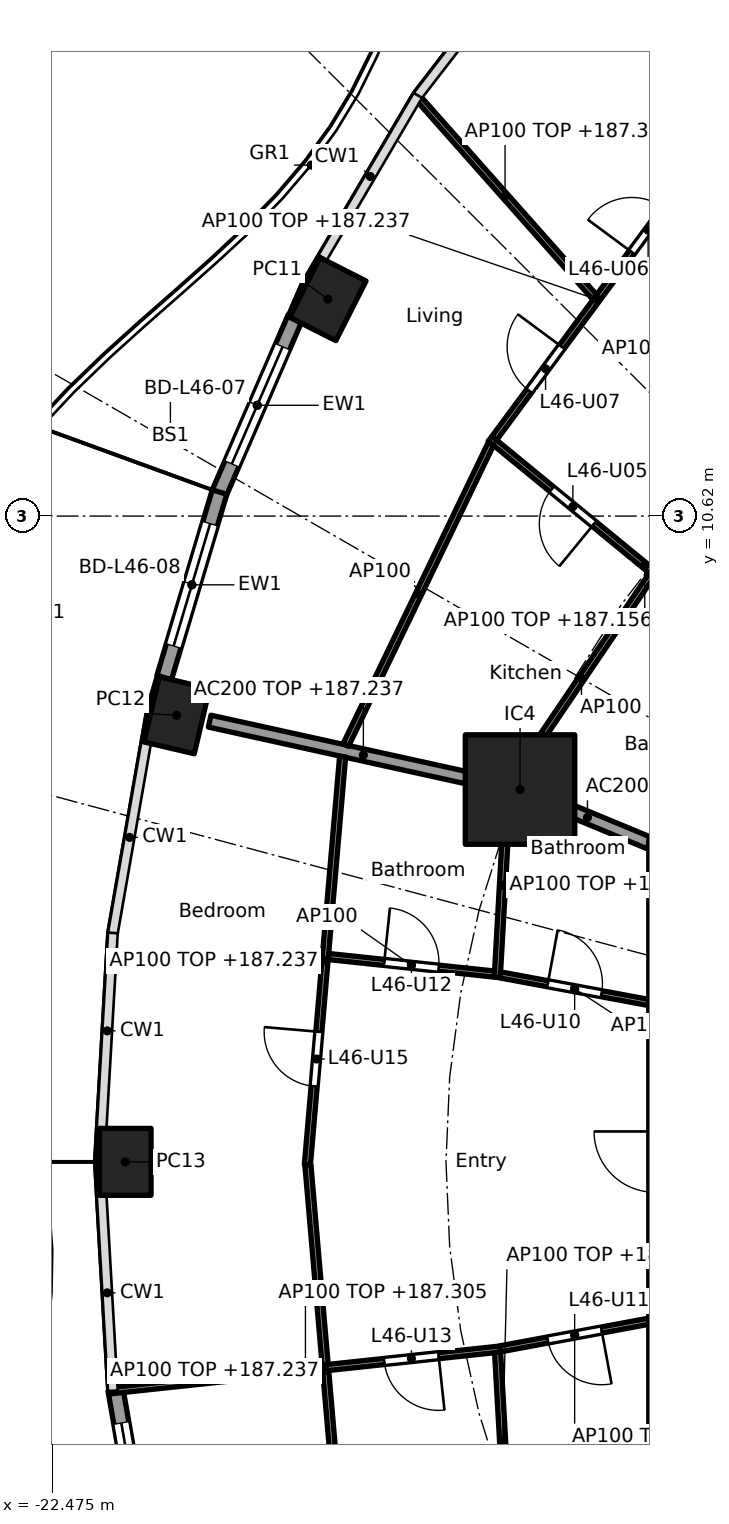
"""IFC4 building model, lengths in metres.
Left out: names, types, materials, properties, quantities, classifications, styles, units other than length and angle.
Written with IfcOpenShell. Run it as: python <this file> out.ifc"""

import sys

from ifc_helpers import new_model, si_unit, direction, frame, frame_2d, origin, origin_2d, place, context, subcontext, project, spatial, rectangle, hollow_rectangle, extrude, element, fill, save


model = new_model("IFC4")
c1 = context("Model", 3, precision=1e-05, world=origin(), true_north=direction((0.0, 1.0)))
c2 = subcontext(c1, "Body", "Model", "MODEL_VIEW")
j1 = project(units=[si_unit("LENGTHUNIT", "METRE"), si_unit("PLANEANGLEUNIT", "RADIAN")], contexts=[c1])
p1 = place(None, origin())
s1 = spatial("IfcSite", under=j1, at=p1, CompositionType="ELEMENT")
p2 = place(p1, origin())
s2 = spatial("IfcBuilding", under=s1, at=p2, CompositionType="ELEMENT")
p3 = place(p2, frame((0.0, 0.0, 184.4)))
s3 = spatial("IfcBuildingStorey", under=s2, at=p3, CompositionType="ELEMENT", Elevation=184.4)
for number, where, z_axis, x_axis in (
    (1, (-17.942, 14.188, 0.0), (0.0, 0.0, 1.0), (-0.452, -0.892, 0.0)),
    (2, (-20.427, 7.344, 0.0), (0.0, 0.0, 1.0), (-0.229, -0.973, 0.0)),
    (3, (-21.275, 0.0, 0.0), (0.0, 0.0, 1.0), (0.0, -1.0, 0.0)),
):
    element("IfcColumn", number, at=place(p3, frame(where, z_axis=z_axis, x_axis=x_axis)), inside=s3, PredefinedType="COLUMN", context=c2, shape_type="SweptSolid", body=[
        extrude(hollow_rectangle(XDim=1.1, YDim=0.85, WallThickness=0.036, at=origin_2d()), origin(), (0.0, 0.0, 1.0), 3.7),
    ])
p4 = place(p3, frame((-14.782, 6.123, 0.0), z_axis=(0.0, 0.0, 1.0), x_axis=(1.0, 0.0, 0.0)))
e4 = element("IfcColumn", 4, at=p4, inside=s3, PredefinedType="COLUMN", context=c2, shape_type="SweptSolid", body=[
    extrude(rectangle(XDim=1.8, YDim=1.8, at=origin_2d()), origin(), (0.0, 0.0, 1.0), 3.7),
])
p5 = place(p3, frame((-19.729, 11.0, 0.0), z_axis=(0.0, 0.0, 1.0), x_axis=(0.397620521824, 0.917549955384, 0.0)))
e5 = element("IfcWall", 5, at=p5, inside=s3, PredefinedType="SOLIDWALL", context=c2, shape_type="SweptSolid", body=[
    extrude(rectangle(XDim=3.142, YDim=0.25, at=frame_2d((1.571, 0.0))), origin(), (0.0, 0.0, 1.0), 3.44),
])
p6 = place(p5, frame((0.521, 0.0, 0.0)))
e6 = element("IfcOpeningElement", 6, at=p6, cuts=e5, PredefinedType="OPENING", context=c2, shape_type="SweptSolid", body=[
    extrude(rectangle(XDim=2.1, YDim=2.4, at=frame_2d((1.05, 1.2))), frame((0.0, 0.135, 0.0), z_axis=(0.0, -1.0, 0.0), x_axis=(1.0, 0.0, 0.0)), (0.0, 0.0, 1.0), 0.27),
])
p7 = place(p3, frame((-20.633, 7.965, 0.0), z_axis=(0.0, 0.0, 1.0), x_axis=(0.28584838049, 0.958274857946, 0.0)))
e7 = element("IfcWall", 7, at=p7, inside=s3, PredefinedType="SOLIDWALL", context=c2, shape_type="SweptSolid", body=[
    extrude(rectangle(XDim=3.182, YDim=0.25, at=frame_2d((1.591, 0.0))), origin(), (0.0, 0.0, 1.0), 3.44),
])
p8 = place(p7, frame((0.541, 0.0, 0.0)))
e8 = element("IfcOpeningElement", 8, at=p8, cuts=e7, PredefinedType="OPENING", context=c2, shape_type="SweptSolid", body=[
    extrude(rectangle(XDim=2.1, YDim=2.4, at=frame_2d((1.05, 1.2))), frame((0.0, 0.135, 0.0), z_axis=(0.0, -1.0, 0.0), x_axis=(1.0, 0.0, 0.0)), (0.0, 0.0, 1.0), 0.27),
])
p9 = place(p3, frame((-20.882, -6.91, 0.0), z_axis=(0.0, 0.0, 1.0), x_axis=(-0.172223552479, 0.98505789067, 0.0)))
e9 = element("IfcWall", 9, at=p9, inside=s3, PredefinedType="SOLIDWALL", context=c2, shape_type="SweptSolid", body=[
    extrude(rectangle(XDim=3.211, YDim=0.25, at=frame_2d((1.605, 0.0))), origin(), (0.0, 0.0, 1.0), 3.44),
])
p10 = place(p9, frame((0.555, 0.0, 0.0)))
e10 = element("IfcOpeningElement", 10, at=p10, cuts=e9, PredefinedType="OPENING", context=c2, shape_type="SweptSolid", body=[
    extrude(rectangle(XDim=2.1, YDim=2.4, at=frame_2d((1.05, 1.2))), frame((0.0, 0.135, 0.0), z_axis=(0.0, -1.0, 0.0), x_axis=(1.0, 0.0, 0.0)), (0.0, 0.0, 1.0), 0.27),
])
p11 = place(p3, frame((-12.657, 5.243, 0.0), z_axis=(0.0, 0.0, 1.0), x_axis=(-0.923859888513, 0.38273085373, 0.0)))
e11 = element("IfcWall", 11, at=p11, inside=s3, PredefinedType="PARTITIONING", context=c2, shape_type="SweptSolid", body=[
    extrude(rectangle(XDim=2.199, YDim=0.2, at=frame_2d((1.1, 0.0))), origin(), (0.0, 0.0, 1.0), 3.44),
])
p12 = place(p3, frame((-14.831, 6.134, 0.0), z_axis=(0.0, 0.0, 1.0), x_axis=(-0.976568396888, 0.215207263354, 0.0)))
e12 = element("IfcWall", 12, at=p12, inside=s3, PredefinedType="PARTITIONING", context=c2, shape_type="SweptSolid", body=[
    extrude(rectangle(XDim=5.177, YDim=0.2, at=frame_2d((2.588, 0.0))), origin(), (0.0, 0.0, 1.0), 2.837),
])
p13 = place(p3, frame((-12.565, 5.304, 0.0), z_axis=(0.0, 0.0, 1.0), x_axis=(0.0, -1.0, 0.0)))
e13 = element("IfcWall", 13, at=p13, inside=s3, PredefinedType="PARTITIONING", context=c2, shape_type="SweptSolid", body=[
    extrude(rectangle(XDim=10.409, YDim=0.2, at=frame_2d((5.205, 0.0))), origin(), (0.0, 0.0, 1.0), 3.44),
])
p14 = place(p13, frame((4.804, 0.0, 0.0)))
e14 = element("IfcOpeningElement", 14, at=p14, cuts=e13, PredefinedType="OPENING", context=c2, shape_type="SweptSolid", body=[
    extrude(rectangle(XDim=1.0, YDim=2.1, at=frame_2d((0.5, 1.05))), frame((0.0, 0.11, 0.0), z_axis=(0.0, -1.0, 0.0), x_axis=(1.0, 0.0, 0.0)), (0.0, 0.0, 1.0), 0.22),
])
p15 = place(p3, frame((-11.832, 16.461, 0.0), z_axis=(0.0, 0.0, 1.0), x_axis=(-0.594704483906, -0.803944386647, 0.0)))
e15 = element("IfcWall", 15, at=p15, inside=s3, PredefinedType="PARTITIONING", context=c2, shape_type="SweptSolid", body=[
    extrude(rectangle(XDim=5.672, YDim=0.1, at=frame_2d((2.836, 0.0))), origin(), (0.0, 0.0, 1.0), 2.837),
])
p16 = place(p15, frame((0.968, 0.0, 0.0)))
e16 = element("IfcOpeningElement", 16, at=p16, cuts=e15, PredefinedType="OPENING", context=c2, shape_type="SweptSolid", body=[
    extrude(rectangle(XDim=0.9, YDim=2.1, at=frame_2d((0.45, 1.05))), frame((0.0, 0.06, 0.0), z_axis=(0.0, -1.0, 0.0), x_axis=(1.0, 0.0, 0.0)), (0.0, 0.0, 1.0), 0.12),
])
p17 = place(p15, frame((3.804, 0.0, 0.0)))
e17 = element("IfcOpeningElement", 17, at=p17, cuts=e15, PredefinedType="OPENING", context=c2, shape_type="SweptSolid", body=[
    extrude(rectangle(XDim=0.9, YDim=2.1, at=frame_2d((0.45, 1.05))), frame((0.0, 0.06, 0.0), z_axis=(0.0, -1.0, 0.0), x_axis=(1.0, 0.0, 0.0)), (0.0, 0.0, 1.0), 0.12),
])
p18 = place(p3, frame((-13.552, 14.219, 0.0), z_axis=(0.0, 0.0, 1.0), x_axis=(-0.663542794709, 0.748138329181, 0.0)))
e18 = element("IfcWall", 18, at=p18, inside=s3, PredefinedType="PARTITIONING", context=c2, shape_type="SweptSolid", body=[
    extrude(rectangle(XDim=4.45, YDim=0.1, at=frame_2d((2.225, 0.0))), origin(), (0.0, 0.0, 1.0), 2.905),
])
p19 = place(p3, frame((-10.189, 7.721, 0.0), z_axis=(0.0, 0.0, 1.0), x_axis=(-0.773121441079, 0.634258021112, 0.0)))
e19 = element("IfcWall", 19, at=p19, inside=s3, PredefinedType="PARTITIONING", context=c2, shape_type="SweptSolid", body=[
    extrude(rectangle(XDim=6.577, YDim=0.1, at=frame_2d((3.289, 0.0))), origin(), (0.0, 0.0, 1.0), 2.756),
])
p20 = place(p19, frame((1.104, 0.0, 0.0)))
e20 = element("IfcOpeningElement", 20, at=p20, cuts=e19, PredefinedType="OPENING", context=c2, shape_type="SweptSolid", body=[
    extrude(rectangle(XDim=0.9, YDim=2.1, at=frame_2d((0.45, 1.05))), frame((0.0, 0.06, 0.0), z_axis=(0.0, -1.0, 0.0), x_axis=(1.0, 0.0, 0.0)), (0.0, 0.0, 1.0), 0.12),
])
p21 = place(p19, frame((4.367, 0.0, 0.0)))
e21 = element("IfcOpeningElement", 21, at=p21, cuts=e19, PredefinedType="OPENING", context=c2, shape_type="SweptSolid", body=[
    extrude(rectangle(XDim=0.9, YDim=2.1, at=frame_2d((0.45, 1.05))), frame((0.0, 0.06, 0.0), z_axis=(0.0, -1.0, 0.0), x_axis=(1.0, 0.0, 0.0)), (0.0, 0.0, 1.0), 0.12),
])
p22 = place(p3, frame((-12.619, 9.65, 0.0), z_axis=(0.0, 0.0, 1.0), x_axis=(-0.561046521684, -0.82778427172, 0.0)))
e22 = element("IfcWall", 22, at=p22, inside=s3, PredefinedType="PARTITIONING", context=c2, shape_type="SweptSolid", body=[
    extrude(rectangle(XDim=4.109, YDim=0.1, at=frame_2d((2.054, 0.0))), origin(), (0.0, 0.0, 1.0), 3.44),
])
p23 = place(p3, frame((-15.257, 11.816, 0.0), z_axis=(0.0, 0.0, 1.0), x_axis=(-0.434027506504, -0.900899619046, 0.0)))
e23 = element("IfcWall", 23, at=p23, inside=s3, PredefinedType="PARTITIONING", context=c2, shape_type="SweptSolid", body=[
    extrude(rectangle(XDim=5.508, YDim=0.1, at=frame_2d((2.754, 0.0))), origin(), (0.0, 0.0, 1.0), 3.44),
])
p24 = place(p3, frame((-14.986, 6.067, 0.0), z_axis=(0.0, 0.0, 1.0), x_axis=(-0.056333452925, -0.998412010185, 0.0)))
e24 = element("IfcWall", 24, at=p24, inside=s3, PredefinedType="PARTITIONING", context=c2, shape_type="SweptSolid", body=[
    extrude(rectangle(XDim=3.038, YDim=0.1, at=frame_2d((1.519, 0.0))), origin(), (0.0, 0.0, 1.0), 2.837),
])
p25 = place(p3, frame((-17.7, 6.664, 0.0), z_axis=(0.0, 0.0, 1.0), x_axis=(-0.086004282666, -0.996294767307, 0.0)))
e25 = element("IfcWall", 25, at=p25, inside=s3, PredefinedType="PARTITIONING", context=c2, shape_type="SweptSolid", body=[
    extrude(rectangle(XDim=6.739, YDim=0.1, at=frame_2d((3.37, 0.0))), origin(), (0.0, 0.0, 1.0), 2.837),
])
p26 = place(p25, frame((4.542, 0.0, 0.0)))
e26 = element("IfcOpeningElement", 26, at=p26, cuts=e25, PredefinedType="OPENING", context=c2, shape_type="SweptSolid", body=[
    extrude(rectangle(XDim=0.9, YDim=2.1, at=frame_2d((0.45, 1.05))), frame((0.0, 0.06, 0.0), z_axis=(0.0, -1.0, 0.0), x_axis=(1.0, 0.0, 0.0)), (0.0, 0.0, 1.0), 0.12),
])
p27 = place(p3, frame((-12.663, 2.621, 0.0), z_axis=(0.0, 0.0, 1.0), x_axis=(-0.983176884312, 0.182655999505, 0.0)))
e27 = element("IfcWall", 27, at=p27, inside=s3, PredefinedType="PARTITIONING", context=c2, shape_type="SweptSolid", body=[
    extrude(rectangle(XDim=2.483, YDim=0.1, at=frame_2d((1.242, 0.0))), origin(), (0.0, 0.0, 1.0), 2.756),
])
p28 = place(p27, frame((0.792, 0.0, 0.0)))
e28 = element("IfcOpeningElement", 28, at=p28, cuts=e27, PredefinedType="OPENING", context=c2, shape_type="SweptSolid", body=[
    extrude(rectangle(XDim=0.9, YDim=2.1, at=frame_2d((0.45, 1.05))), frame((0.0, 0.06, 0.0), z_axis=(0.0, -1.0, 0.0), x_axis=(1.0, 0.0, 0.0)), (0.0, 0.0, 1.0), 0.12),
])
p29 = place(p3, frame((-15.204, 3.089, 0.0), z_axis=(0.0, 0.0, 1.0), x_axis=(-0.994477149695, 0.104953316934, 0.0)))
e29 = element("IfcWall", 29, at=p29, inside=s3, PredefinedType="PARTITIONING", context=c2, shape_type="SweptSolid", body=[
    extrude(rectangle(XDim=2.745, YDim=0.1, at=frame_2d((1.373, 0.0))), origin(), (0.0, 0.0, 1.0), 3.44),
])
p30 = place(p29, frame((0.922, 0.0, 0.0)))
e30 = element("IfcOpeningElement", 30, at=p30, cuts=e29, PredefinedType="OPENING", context=c2, shape_type="SweptSolid", body=[
    extrude(rectangle(XDim=0.9, YDim=2.1, at=frame_2d((0.45, 1.05))), frame((0.0, 0.06, 0.0), z_axis=(0.0, -1.0, 0.0), x_axis=(1.0, 0.0, 0.0)), (0.0, 0.0, 1.0), 0.12),
])
p31 = place(p3, frame((-18.271, -0.05, 0.0), z_axis=(0.0, 0.0, 1.0), x_axis=(0.086018199227, -0.996293565874, 0.0)))
e31 = element("IfcWall", 31, at=p31, inside=s3, PredefinedType="PARTITIONING", context=c2, shape_type="SweptSolid", body=[
    extrude(rectangle(XDim=6.789, YDim=0.1, at=frame_2d((3.395, 0.0))), origin(), (0.0, 0.0, 1.0), 2.837),
])
p32 = place(p3, frame((-12.663, -2.621, 0.0), z_axis=(0.0, 0.0, 1.0), x_axis=(-0.983176884312, -0.182655999505, 0.0)))
e32 = element("IfcWall", 32, at=p32, inside=s3, PredefinedType="PARTITIONING", context=c2, shape_type="SweptSolid", body=[
    extrude(rectangle(XDim=2.483, YDim=0.1, at=frame_2d((1.242, 0.0))), origin(), (0.0, 0.0, 1.0), 2.756),
])
p33 = place(p32, frame((0.792, 0.0, 0.0)))
e33 = element("IfcOpeningElement", 33, at=p33, cuts=e32, PredefinedType="OPENING", context=c2, shape_type="SweptSolid", body=[
    extrude(rectangle(XDim=0.9, YDim=2.1, at=frame_2d((0.45, 1.05))), frame((0.0, 0.06, 0.0), z_axis=(0.0, -1.0, 0.0), x_axis=(1.0, 0.0, 0.0)), (0.0, 0.0, 1.0), 0.12),
])
p34 = place(p3, frame((-15.104, -3.078, 0.0), z_axis=(0.0, 0.0, 1.0), x_axis=(-0.994316167803, -0.106467640365, 0.0)))
e34 = element("IfcWall", 34, at=p34, inside=s3, PredefinedType="PARTITIONING", context=c2, shape_type="SweptSolid", body=[
    extrude(rectangle(XDim=6.45, YDim=0.1, at=frame_2d((3.225, 0.0))), origin(), (0.0, 0.0, 1.0), 2.905),
])
p35 = place(p34, frame((1.022, 0.0, 0.0)))
e35 = element("IfcOpeningElement", 35, at=p35, cuts=e34, PredefinedType="OPENING", context=c2, shape_type="SweptSolid", body=[
    extrude(rectangle(XDim=0.9, YDim=2.1, at=frame_2d((0.45, 1.05))), frame((0.0, 0.06, 0.0), z_axis=(0.0, -1.0, 0.0), x_axis=(1.0, 0.0, 0.0)), (0.0, 0.0, 1.0), 0.12),
])
p36 = place(p3, frame((-15.151, -3.133, 0.0), z_axis=(0.0, 0.0, 1.0), x_axis=(0.05637501378, -0.998409664327, 0.0)))
e36 = element("IfcWall", 36, at=p36, inside=s3, PredefinedType="PARTITIONING", context=c2, shape_type="SweptSolid", body=[
    extrude(rectangle(XDim=2.988, YDim=0.1, at=frame_2d((1.494, 0.0))), origin(), (0.0, 0.0, 1.0), 2.837),
])
p37 = place(p6, origin())
e37 = element("IfcDoor", 37, at=p37, inside=s3, OperationType="SLIDING_TO_LEFT", PredefinedType="DOOR", context=c2, shape_type="SweptSolid", body=[
    extrude(rectangle(XDim=2.1, YDim=2.4, at=frame_2d((1.05, 1.2))), frame((0.0, 0.025, 0.0), z_axis=(0.0, -1.0, 0.0), x_axis=(1.0, 0.0, 0.0)), (0.0, 0.0, 1.0), 0.05),
])
fill(e6, e37)
p38 = place(p8, origin())
e38 = element("IfcDoor", 38, at=p38, inside=s3, OperationType="SLIDING_TO_LEFT", PredefinedType="DOOR", context=c2, shape_type="SweptSolid", body=[
    extrude(rectangle(XDim=2.1, YDim=2.4, at=frame_2d((1.05, 1.2))), frame((0.0, 0.025, 0.0), z_axis=(0.0, -1.0, 0.0), x_axis=(1.0, 0.0, 0.0)), (0.0, 0.0, 1.0), 0.05),
])
fill(e8, e38)
p39 = place(p10, origin())
e39 = element("IfcDoor", 39, at=p39, inside=s3, OperationType="SLIDING_TO_LEFT", PredefinedType="DOOR", context=c2, shape_type="SweptSolid", body=[
    extrude(rectangle(XDim=2.1, YDim=2.4, at=frame_2d((1.05, 1.2))), frame((0.0, 0.025, 0.0), z_axis=(0.0, -1.0, 0.0), x_axis=(1.0, 0.0, 0.0)), (0.0, 0.0, 1.0), 0.05),
])
fill(e10, e39)
p40 = place(p21, origin())
e40 = element("IfcDoor", 40, at=p40, inside=s3, OperationType="SINGLE_SWING_LEFT", PredefinedType="DOOR", context=c2, shape_type="SweptSolid", body=[
    extrude(rectangle(XDim=0.9, YDim=2.1, at=frame_2d((0.45, 1.05))), frame((0.0, 0.025, 0.0), z_axis=(0.0, -1.0, 0.0), x_axis=(1.0, 0.0, 0.0)), (0.0, 0.0, 1.0), 0.05),
])
fill(e21, e40)
p41 = place(p16, frame((0.9, 0.0, 0.0), x_axis=(-1.0, 0.0, 0.0)))
e41 = element("IfcDoor", 41, at=p41, inside=s3, OperationType="SINGLE_SWING_LEFT", PredefinedType="DOOR", context=c2, shape_type="SweptSolid", body=[
    extrude(rectangle(XDim=0.9, YDim=2.1, at=frame_2d((0.45, 1.05))), frame((0.0, 0.025, 0.0), z_axis=(0.0, -1.0, 0.0), x_axis=(1.0, 0.0, 0.0)), (0.0, 0.0, 1.0), 0.05),
])
fill(e16, e41)
p42 = place(p17, frame((0.9, 0.0, 0.0), x_axis=(-1.0, 0.0, 0.0)))
e42 = element("IfcDoor", 42, at=p42, inside=s3, OperationType="SINGLE_SWING_RIGHT", PredefinedType="DOOR", context=c2, shape_type="SweptSolid", body=[
    extrude(rectangle(XDim=0.9, YDim=2.1, at=frame_2d((0.45, 1.05))), frame((0.0, 0.025, 0.0), z_axis=(0.0, -1.0, 0.0), x_axis=(1.0, 0.0, 0.0)), (0.0, 0.0, 1.0), 0.05),
])
fill(e17, e42)
p43 = place(p28, frame((0.9, 0.0, 0.0), x_axis=(-1.0, 0.0, 0.0)))
e43 = element("IfcDoor", 43, at=p43, inside=s3, OperationType="SINGLE_SWING_LEFT", PredefinedType="DOOR", context=c2, shape_type="SweptSolid", body=[
    extrude(rectangle(XDim=0.9, YDim=2.1, at=frame_2d((0.45, 1.05))), frame((0.0, 0.025, 0.0), z_axis=(0.0, -1.0, 0.0), x_axis=(1.0, 0.0, 0.0)), (0.0, 0.0, 1.0), 0.05),
])
fill(e28, e43)
p44 = place(p33, origin())
e44 = element("IfcDoor", 44, at=p44, inside=s3, OperationType="SINGLE_SWING_LEFT", PredefinedType="DOOR", context=c2, shape_type="SweptSolid", body=[
    extrude(rectangle(XDim=0.9, YDim=2.1, at=frame_2d((0.45, 1.05))), frame((0.0, 0.025, 0.0), z_axis=(0.0, -1.0, 0.0), x_axis=(1.0, 0.0, 0.0)), (0.0, 0.0, 1.0), 0.05),
])
fill(e33, e44)
p45 = place(p30, frame((0.9, 0.0, 0.0), x_axis=(-1.0, 0.0, 0.0)))
e45 = element("IfcDoor", 45, at=p45, inside=s3, OperationType="SINGLE_SWING_LEFT", PredefinedType="DOOR", context=c2, shape_type="SweptSolid", body=[
    extrude(rectangle(XDim=0.9, YDim=2.1, at=frame_2d((0.45, 1.05))), frame((0.0, 0.025, 0.0), z_axis=(0.0, -1.0, 0.0), x_axis=(1.0, 0.0, 0.0)), (0.0, 0.0, 1.0), 0.05),
])
fill(e30, e45)
p46 = place(p35, origin())
e46 = element("IfcDoor", 46, at=p46, inside=s3, OperationType="SINGLE_SWING_LEFT", PredefinedType="DOOR", context=c2, shape_type="SweptSolid", body=[
    extrude(rectangle(XDim=0.9, YDim=2.1, at=frame_2d((0.45, 1.05))), frame((0.0, 0.025, 0.0), z_axis=(0.0, -1.0, 0.0), x_axis=(1.0, 0.0, 0.0)), (0.0, 0.0, 1.0), 0.05),
])
fill(e35, e46)
p47 = place(p26, frame((0.9, 0.0, 0.0), x_axis=(-1.0, 0.0, 0.0)))
e47 = element("IfcDoor", 47, at=p47, inside=s3, OperationType="SINGLE_SWING_RIGHT", PredefinedType="DOOR", context=c2, shape_type="SweptSolid", body=[
    extrude(rectangle(XDim=0.9, YDim=2.1, at=frame_2d((0.45, 1.05))), frame((0.0, 0.025, 0.0), z_axis=(0.0, -1.0, 0.0), x_axis=(1.0, 0.0, 0.0)), (0.0, 0.0, 1.0), 0.05),
])
fill(e26, e47)
save(model, sys.argv[1])
